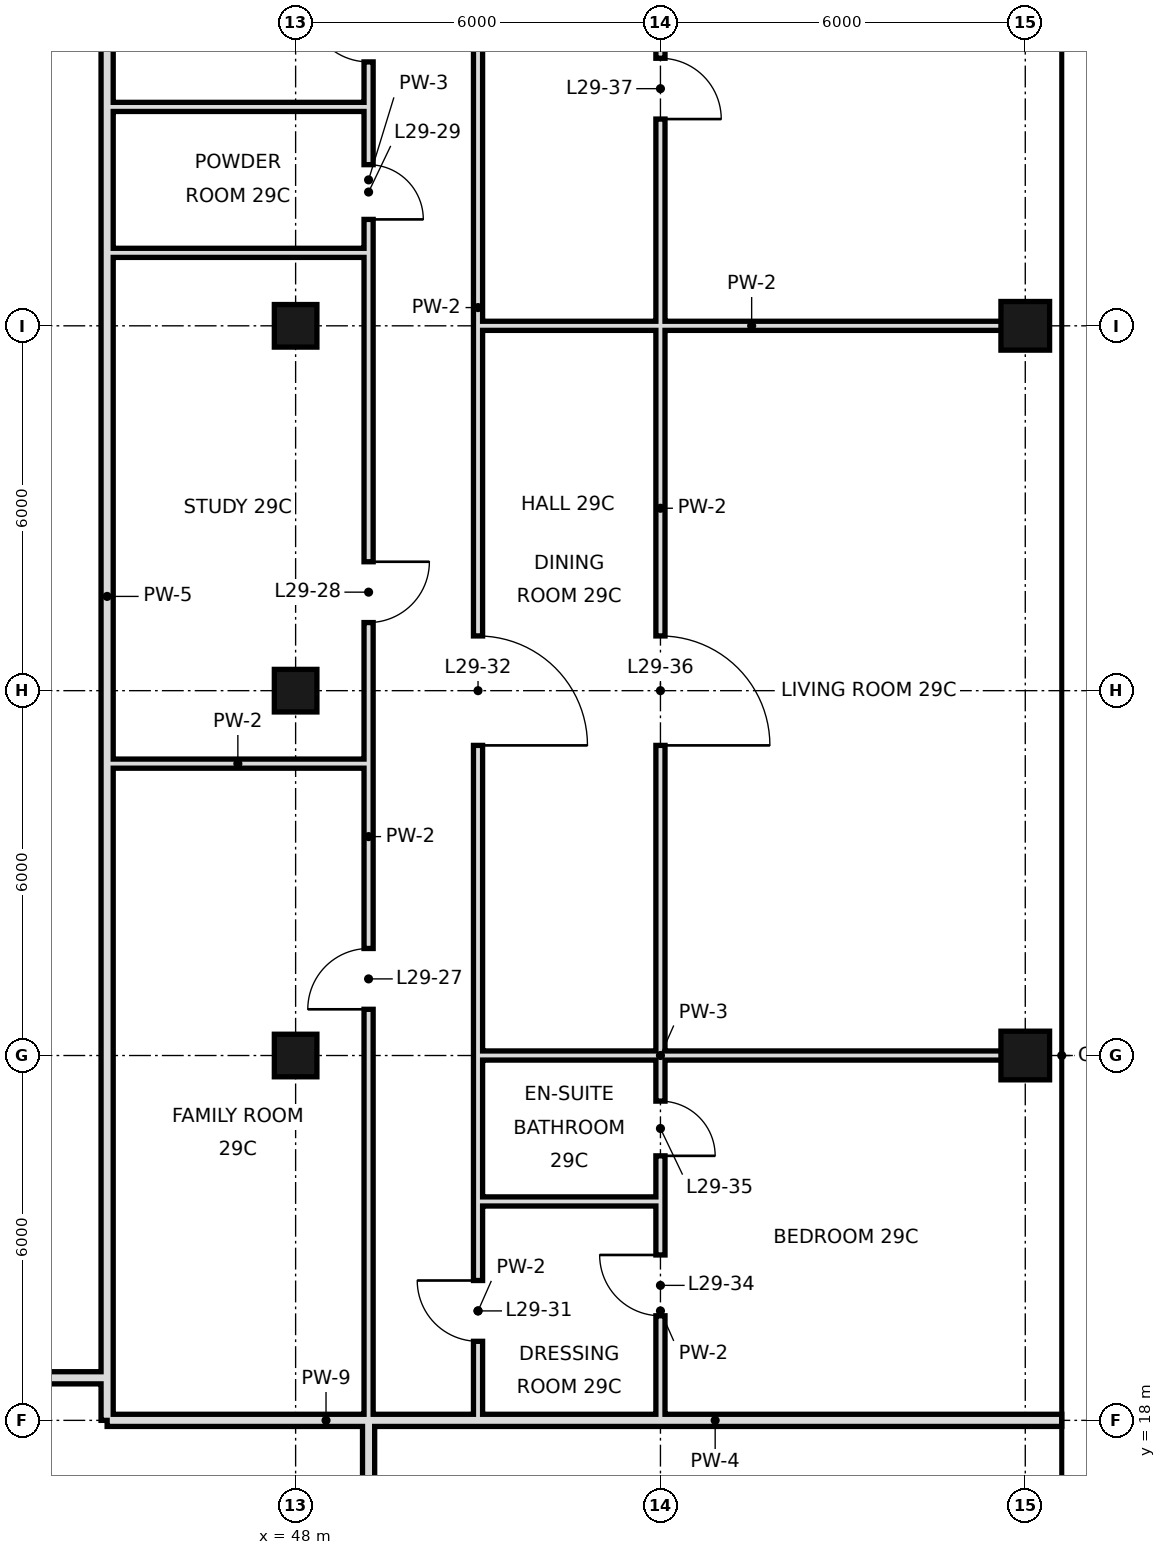
"""IFC4 building model, lengths in metres.
Left out: names, types, materials, properties, quantities, classifications, styles, units other than length and angle.
Written with IfcOpenShell. Run it as: python <this file> out.ifc"""

import sys

from ifc_helpers import new_model, si_unit, direction, frame, frame_2d, origin, origin_2d, place, context, subcontext, project, spatial, rectangle, hollow_rectangle, extrude, element, fill, save


model = new_model("IFC4")
c1 = context("Model", 3, precision=1e-05, world=origin(), true_north=direction((0.0, 1.0)))
c2 = subcontext(c1, "Body", "Model", "MODEL_VIEW")
j1 = project(units=[si_unit("LENGTHUNIT", "METRE"), si_unit("PLANEANGLEUNIT", "RADIAN")], contexts=[c1])
p1 = place(None, origin())
s1 = spatial("IfcSite", under=j1, at=p1, CompositionType="ELEMENT")
p2 = place(p1, origin())
s2 = spatial("IfcBuilding", under=s1, at=p2, CompositionType="ELEMENT")
p3 = place(p2, frame((0.0, 0.0, 130.4)))
s3 = spatial("IfcBuildingStorey", under=s2, at=p3, CompositionType="ELEMENT", Elevation=130.4)
for number, where, z_axis, x_axis in (
    (1, (48.0, 24.0, 0.0), (0.0, 0.0, 1.0), (1.0, 0.0, 0.0)),
    (2, (48.0, 30.0, 0.0), (0.0, 0.0, 1.0), (1.0, 0.0, 0.0)),
    (3, (48.0, 36.0, 0.0), (0.0, 0.0, 1.0), (1.0, 0.0, 0.0)),
):
    element("IfcColumn", number, at=place(p3, frame(where, z_axis=z_axis, x_axis=x_axis)), inside=s3, PredefinedType="COLUMN", context=c2, shape_type="SweptSolid", body=[
        extrude(hollow_rectangle(XDim=0.7, YDim=0.7, WallThickness=0.036, at=origin_2d()), origin(), (0.0, 0.0, 1.0), 3.6),
    ])
for number, where, z_axis, x_axis in (
    (4, (60.0, 24.0, 0.0), (0.0, 0.0, 1.0), (1.0, 0.0, 0.0)),
    (5, (60.0, 36.0, 0.0), (0.0, 0.0, 1.0), (1.0, 0.0, 0.0)),
):
    element("IfcColumn", number, at=place(p3, frame(where, z_axis=z_axis, x_axis=x_axis)), inside=s3, PredefinedType="COLUMN", context=c2, shape_type="SweptSolid", body=[
        extrude(hollow_rectangle(XDim=0.8, YDim=0.8, WallThickness=0.04, at=origin_2d()), origin(), (0.0, 0.0, 1.0), 3.6),
    ])
p4 = place(p3, frame((44.9, 18.7, 0.0), z_axis=(0.0, 0.0, 1.0), x_axis=(0.0, 1.0, 0.0)))
e6 = element("IfcWall", 6, at=p4, inside=s3, PredefinedType="SOLIDWALL", context=c2, shape_type="SweptSolid", body=[
    extrude(rectangle(XDim=25.7, YDim=0.2, at=frame_2d((12.85, 0.0))), origin(), (0.0, 0.0, 1.0), 2.97),
])
p5 = place(p4, frame((22.7, 0.0, 0.0)))
e7 = element("IfcOpeningElement", 7, at=p5, cuts=e6, PredefinedType="OPENING", context=c2, shape_type="SweptSolid", body=[
    extrude(rectangle(XDim=1.2, YDim=2.4, at=frame_2d((0.6, 1.2))), frame((0.0, 0.11, 0.0), z_axis=(0.0, -1.0, 0.0), x_axis=(1.0, 0.0, 0.0)), (0.0, 0.0, 1.0), 0.22),
])
p6 = place(p3, frame((44.9, 18.0, 0.0), z_axis=(0.0, 0.0, 1.0), x_axis=(0.0, 1.0, 0.0)))
e8 = element("IfcWall", 8, at=p6, inside=s3, PredefinedType="SOLIDWALL", context=c2, shape_type="SweptSolid", body=[
    extrude(rectangle(XDim=0.7, YDim=0.2, at=frame_2d((0.35, 0.0))), origin(), (0.0, 0.0, 1.0), 2.97),
])
p7 = place(p3, frame((49.2, 10.8, 0.0), z_axis=(0.0, 0.0, 1.0), x_axis=(0.0, 1.0, 0.0)))
e9 = element("IfcWall", 9, at=p7, inside=s3, PredefinedType="SOLIDWALL", context=c2, shape_type="SweptSolid", body=[
    extrude(rectangle(XDim=7.2, YDim=0.2, at=frame_2d((3.6, 0.0))), origin(), (0.0, 0.0, 1.0), 2.72),
])
p8 = place(p3, frame((49.2, 18.0, 0.0), z_axis=(0.0, 0.0, 1.0), x_axis=(0.0, 1.0, 0.0)))
e10 = element("IfcWall", 10, at=p8, inside=s3, PredefinedType="PARTITIONING", context=c2, shape_type="SweptSolid", body=[
    extrude(rectangle(XDim=19.2, YDim=0.15, at=frame_2d((9.6, 0.0))), origin(), (0.0, 0.0, 1.0), 3.42),
])
p9 = place(p8, frame((6.76, 0.0, 0.0)))
e11 = element("IfcOpeningElement", 11, at=p9, cuts=e10, PredefinedType="OPENING", context=c2, shape_type="SweptSolid", body=[
    extrude(rectangle(XDim=1.0, YDim=2.4, at=frame_2d((0.5, 1.2))), frame((0.0, 0.085, 0.0), z_axis=(0.0, -1.0, 0.0), x_axis=(1.0, 0.0, 0.0)), (0.0, 0.0, 1.0), 0.17),
])
p10 = place(p8, frame((13.12, 0.0, 0.0)))
e12 = element("IfcOpeningElement", 12, at=p10, cuts=e10, PredefinedType="OPENING", context=c2, shape_type="SweptSolid", body=[
    extrude(rectangle(XDim=1.0, YDim=2.4, at=frame_2d((0.5, 1.2))), frame((0.0, 0.085, 0.0), z_axis=(0.0, -1.0, 0.0), x_axis=(1.0, 0.0, 0.0)), (0.0, 0.0, 1.0), 0.17),
])
p11 = place(p3, frame((49.2, 39.6, 0.0), z_axis=(0.0, 0.0, 1.0), x_axis=(0.0, 1.0, 0.0)))
e13 = element("IfcWall", 13, at=p11, inside=s3, PredefinedType="PARTITIONING", context=c2, shape_type="SweptSolid", body=[
    extrude(rectangle(XDim=4.8, YDim=0.15, at=frame_2d((2.4, 0.0))), origin(), (0.0, 0.0, 1.0), 3.42),
])
p12 = place(p11, frame((0.74, 0.0, 0.0)))
e14 = element("IfcOpeningElement", 14, at=p12, cuts=e13, PredefinedType="OPENING", context=c2, shape_type="SweptSolid", body=[
    extrude(rectangle(XDim=1.0, YDim=2.4, at=frame_2d((0.5, 1.2))), frame((0.0, 0.085, 0.0), z_axis=(0.0, -1.0, 0.0), x_axis=(1.0, 0.0, 0.0)), (0.0, 0.0, 1.0), 0.17),
])
p13 = place(p3, frame((49.2, 37.2, 0.0), z_axis=(0.0, 0.0, 1.0), x_axis=(0.0, 1.0, 0.0)))
e15 = element("IfcWall", 15, at=p13, inside=s3, PredefinedType="PARTITIONING", context=c2, shape_type="SweptSolid", body=[
    extrude(rectangle(XDim=2.4, YDim=0.15, at=frame_2d((1.2, 0.0))), origin(), (0.0, 0.0, 1.0), 3.42),
])
p14 = place(p13, frame((0.55, 0.0, 0.0)))
e16 = element("IfcOpeningElement", 16, at=p14, cuts=e15, PredefinedType="OPENING", context=c2, shape_type="SweptSolid", body=[
    extrude(rectangle(XDim=0.9, YDim=2.4, at=frame_2d((0.45, 1.2))), frame((0.0, 0.085, 0.0), z_axis=(0.0, -1.0, 0.0), x_axis=(1.0, 0.0, 0.0)), (0.0, 0.0, 1.0), 0.17),
])
p15 = place(p3, frame((51.0, 18.0, 0.0), z_axis=(0.0, 0.0, 1.0), x_axis=(0.0, 1.0, 0.0)))
e17 = element("IfcWall", 17, at=p15, inside=s3, PredefinedType="PARTITIONING", context=c2, shape_type="SweptSolid", body=[
    extrude(rectangle(XDim=3.6, YDim=0.15, at=frame_2d((1.8, 0.0))), origin(), (0.0, 0.0, 1.0), 3.42),
])
p16 = place(p15, frame((1.3, 0.0, 0.0)))
e18 = element("IfcOpeningElement", 18, at=p16, cuts=e17, PredefinedType="OPENING", context=c2, shape_type="SweptSolid", body=[
    extrude(rectangle(XDim=1.0, YDim=2.4, at=frame_2d((0.5, 1.2))), frame((0.0, 0.085, 0.0), z_axis=(0.0, -1.0, 0.0), x_axis=(1.0, 0.0, 0.0)), (0.0, 0.0, 1.0), 0.17),
])
p17 = place(p3, frame((51.0, 24.0, 0.0), z_axis=(0.0, 0.0, 1.0), x_axis=(0.0, 1.0, 0.0)))
e19 = element("IfcWall", 19, at=p17, inside=s3, PredefinedType="PARTITIONING", context=c2, shape_type="SweptSolid", body=[
    extrude(rectangle(XDim=24.6, YDim=0.15, at=frame_2d((12.3, 0.0))), origin(), (0.0, 0.0, 1.0), 3.42),
])
p18 = place(p17, frame((5.1, 0.0, 0.0)))
e20 = element("IfcOpeningElement", 20, at=p18, cuts=e19, PredefinedType="OPENING", context=c2, shape_type="SweptSolid", body=[
    extrude(rectangle(XDim=1.8, YDim=2.4, at=frame_2d((0.9, 1.2))), frame((0.0, 0.085, 0.0), z_axis=(0.0, -1.0, 0.0), x_axis=(1.0, 0.0, 0.0)), (0.0, 0.0, 1.0), 0.17),
])
p19 = place(p17, frame((19.6, 0.0, 0.0)))
e21 = element("IfcOpeningElement", 21, at=p19, cuts=e19, PredefinedType="OPENING", context=c2, shape_type="SweptSolid", body=[
    extrude(rectangle(XDim=1.0, YDim=2.4, at=frame_2d((0.5, 1.2))), frame((0.0, 0.085, 0.0), z_axis=(0.0, -1.0, 0.0), x_axis=(1.0, 0.0, 0.0)), (0.0, 0.0, 1.0), 0.17),
])
p20 = place(p3, frame((51.0, 21.6, 0.0), z_axis=(0.0, 0.0, 1.0), x_axis=(0.0, 1.0, 0.0)))
e22 = element("IfcWall", 22, at=p20, inside=s3, PredefinedType="PARTITIONING", context=c2, shape_type="SweptSolid", body=[
    extrude(rectangle(XDim=2.4, YDim=0.15, at=frame_2d((1.2, 0.0))), origin(), (0.0, 0.0, 1.0), 3.42),
])
p21 = place(p3, frame((54.0, 18.0, 0.0), z_axis=(0.0, 0.0, 1.0), x_axis=(0.0, 1.0, 0.0)))
e23 = element("IfcWall", 23, at=p21, inside=s3, PredefinedType="PARTITIONING", context=c2, shape_type="SweptSolid", body=[
    extrude(rectangle(XDim=3.6, YDim=0.15, at=frame_2d((1.8, 0.0))), origin(), (0.0, 0.0, 1.0), 3.42),
])
p22 = place(p21, frame((1.72, 0.0, 0.0)))
e24 = element("IfcOpeningElement", 24, at=p22, cuts=e23, PredefinedType="OPENING", context=c2, shape_type="SweptSolid", body=[
    extrude(rectangle(XDim=1.0, YDim=2.4, at=frame_2d((0.5, 1.2))), frame((0.0, 0.085, 0.0), z_axis=(0.0, -1.0, 0.0), x_axis=(1.0, 0.0, 0.0)), (0.0, 0.0, 1.0), 0.17),
])
p23 = place(p3, frame((54.0, 24.0, 0.0), z_axis=(0.0, 0.0, 1.0), x_axis=(0.0, 1.0, 0.0)))
e25 = element("IfcWall", 25, at=p23, inside=s3, PredefinedType="PARTITIONING", context=c2, shape_type="SweptSolid", body=[
    extrude(rectangle(XDim=24.0, YDim=0.15, at=frame_2d((12.0, 0.0))), origin(), (0.0, 0.0, 1.0), 3.42),
])
p24 = place(p23, frame((5.1, 0.0, 0.0)))
e26 = element("IfcOpeningElement", 26, at=p24, cuts=e25, PredefinedType="OPENING", context=c2, shape_type="SweptSolid", body=[
    extrude(rectangle(XDim=1.8, YDim=2.4, at=frame_2d((0.9, 1.2))), frame((0.0, 0.085, 0.0), z_axis=(0.0, -1.0, 0.0), x_axis=(1.0, 0.0, 0.0)), (0.0, 0.0, 1.0), 0.17),
])
p25 = place(p23, frame((15.4, 0.0, 0.0)))
e27 = element("IfcOpeningElement", 27, at=p25, cuts=e25, PredefinedType="OPENING", context=c2, shape_type="SweptSolid", body=[
    extrude(rectangle(XDim=1.0, YDim=2.4, at=frame_2d((0.5, 1.2))), frame((0.0, 0.085, 0.0), z_axis=(0.0, -1.0, 0.0), x_axis=(1.0, 0.0, 0.0)), (0.0, 0.0, 1.0), 0.17),
])
p26 = place(p3, frame((54.0, 21.6, 0.0), z_axis=(0.0, 0.0, 1.0), x_axis=(0.0, 1.0, 0.0)))
e28 = element("IfcWall", 28, at=p26, inside=s3, PredefinedType="PARTITIONING", context=c2, shape_type="SweptSolid", body=[
    extrude(rectangle(XDim=2.4, YDim=0.15, at=frame_2d((1.2, 0.0))), origin(), (0.0, 0.0, 1.0), 3.42),
])
p27 = place(p26, frame((0.75, 0.0, 0.0)))
e29 = element("IfcOpeningElement", 29, at=p27, cuts=e28, PredefinedType="OPENING", context=c2, shape_type="SweptSolid", body=[
    extrude(rectangle(XDim=0.9, YDim=2.4, at=frame_2d((0.45, 1.2))), frame((0.0, 0.085, 0.0), z_axis=(0.0, -1.0, 0.0), x_axis=(1.0, 0.0, 0.0)), (0.0, 0.0, 1.0), 0.17),
])
p28 = place(p3, frame((44.9, 18.0, 0.0), z_axis=(0.0, 0.0, 1.0), x_axis=(1.0, 0.0, 0.0)))
e30 = element("IfcWall", 30, at=p28, inside=s3, PredefinedType="SOLIDWALL", context=c2, shape_type="SweptSolid", body=[
    extrude(rectangle(XDim=4.3, YDim=0.2, at=frame_2d((2.15, 0.0))), origin(), (0.0, 0.0, 1.0), 2.72),
])
p29 = place(p3, frame((49.2, 18.0, 0.0), z_axis=(0.0, 0.0, 1.0), x_axis=(1.0, 0.0, 0.0)))
e31 = element("IfcWall", 31, at=p29, inside=s3, PredefinedType="SOLIDWALL", context=c2, shape_type="SweptSolid", body=[
    extrude(rectangle(XDim=11.4, YDim=0.2, at=frame_2d((5.7, 0.0))), origin(), (0.0, 0.0, 1.0), 2.72),
])
p30 = place(p3, frame((43.8, 18.7, 0.0), z_axis=(0.0, 0.0, 1.0), x_axis=(1.0, 0.0, 0.0)))
e32 = element("IfcWall", 32, at=p30, inside=s3, PredefinedType="SOLIDWALL", context=c2, shape_type="SweptSolid", body=[
    extrude(rectangle(XDim=1.1, YDim=0.2, at=frame_2d((0.55, 0.0))), origin(), (0.0, 0.0, 1.0), 3.42),
])
p31 = place(p3, frame((51.0, 21.6, 0.0), z_axis=(0.0, 0.0, 1.0), x_axis=(1.0, 0.0, 0.0)))
e33 = element("IfcWall", 33, at=p31, inside=s3, PredefinedType="PARTITIONING", context=c2, shape_type="SweptSolid", body=[
    extrude(rectangle(XDim=3.0, YDim=0.15, at=frame_2d((1.5, 0.0))), origin(), (0.0, 0.0, 1.0), 3.42),
])
p32 = place(p3, frame((54.0, 24.0, 0.0), z_axis=(0.0, 0.0, 1.0), x_axis=(1.0, 0.0, 0.0)))
e34 = element("IfcWall", 34, at=p32, inside=s3, PredefinedType="PARTITIONING", context=c2, shape_type="SweptSolid", body=[
    extrude(rectangle(XDim=6.0, YDim=0.15, at=frame_2d((3.0, 0.0))), origin(), (0.0, 0.0, 1.0), 2.72),
])
p33 = place(p3, frame((51.0, 24.0, 0.0), z_axis=(0.0, 0.0, 1.0), x_axis=(1.0, 0.0, 0.0)))
e35 = element("IfcWall", 35, at=p33, inside=s3, PredefinedType="PARTITIONING", context=c2, shape_type="SweptSolid", body=[
    extrude(rectangle(XDim=3.0, YDim=0.15, at=frame_2d((1.5, 0.0))), origin(), (0.0, 0.0, 1.0), 2.72),
])
p34 = place(p3, frame((44.9, 28.8, 0.0), z_axis=(0.0, 0.0, 1.0), x_axis=(1.0, 0.0, 0.0)))
e36 = element("IfcWall", 36, at=p34, inside=s3, PredefinedType="PARTITIONING", context=c2, shape_type="SweptSolid", body=[
    extrude(rectangle(XDim=4.3, YDim=0.15, at=frame_2d((2.15, 0.0))), origin(), (0.0, 0.0, 1.0), 3.42),
])
p35 = place(p3, frame((51.0, 36.0, 0.0), z_axis=(0.0, 0.0, 1.0), x_axis=(1.0, 0.0, 0.0)))
e37 = element("IfcWall", 37, at=p35, inside=s3, PredefinedType="PARTITIONING", context=c2, shape_type="SweptSolid", body=[
    extrude(rectangle(XDim=9.0, YDim=0.15, at=frame_2d((4.5, 0.0))), origin(), (0.0, 0.0, 1.0), 2.72),
])
for number, where, z_axis, x_axis in (
    (38, (44.9, 37.2, 0.0), (0.0, 0.0, 1.0), (1.0, 0.0, 0.0)),
    (39, (44.9, 39.6, 0.0), (0.0, 0.0, 1.0), (1.0, 0.0, 0.0)),
):
    element("IfcWall", number, at=place(p3, frame(where, z_axis=z_axis, x_axis=x_axis)), inside=s3, PredefinedType="PARTITIONING", context=c2, shape_type="SweptSolid", body=[
        extrude(rectangle(XDim=4.3, YDim=0.15, at=frame_2d((2.15, 0.0))), origin(), (0.0, 0.0, 1.0), 3.42),
    ])
p36 = place(p12, frame((1.0, 0.0, 0.0), z_axis=(0.0, 0.0, 1.0), x_axis=(-1.0, 0.0, 0.0)))
e40 = element("IfcDoor", 40, at=p36, inside=s3, OperationType="SINGLE_SWING_LEFT", PredefinedType="DOOR", context=c2, shape_type="SweptSolid", body=[
    extrude(rectangle(XDim=1.0, YDim=2.4, at=frame_2d((0.5, 1.2))), frame((0.0, 0.025, 0.0), z_axis=(0.0, -1.0, 0.0), x_axis=(1.0, 0.0, 0.0)), (0.0, 0.0, 1.0), 0.05),
])
fill(e14, e40)
p37 = place(p9, origin())
e41 = element("IfcDoor", 41, at=p37, inside=s3, OperationType="SINGLE_SWING_LEFT", PredefinedType="DOOR", context=c2, shape_type="SweptSolid", body=[
    extrude(rectangle(XDim=1.0, YDim=2.4, at=frame_2d((0.5, 1.2))), frame((0.0, 0.025, 0.0), z_axis=(0.0, -1.0, 0.0), x_axis=(1.0, 0.0, 0.0)), (0.0, 0.0, 1.0), 0.05),
])
fill(e11, e41)
p38 = place(p10, origin())
e42 = element("IfcDoor", 42, at=p38, inside=s3, OperationType="SINGLE_SWING_RIGHT", PredefinedType="DOOR", context=c2, shape_type="SweptSolid", body=[
    extrude(rectangle(XDim=1.0, YDim=2.4, at=frame_2d((0.5, 1.2))), frame((0.0, 0.025, 0.0), z_axis=(0.0, -1.0, 0.0), x_axis=(1.0, 0.0, 0.0)), (0.0, 0.0, 1.0), 0.05),
])
fill(e12, e42)
p39 = place(p14, frame((0.9, 0.0, 0.0), z_axis=(0.0, 0.0, 1.0), x_axis=(-1.0, 0.0, 0.0)))
e43 = element("IfcDoor", 43, at=p39, inside=s3, OperationType="SINGLE_SWING_RIGHT", PredefinedType="DOOR", context=c2, shape_type="SweptSolid", body=[
    extrude(rectangle(XDim=0.9, YDim=2.4, at=frame_2d((0.45, 1.2))), frame((0.0, 0.025, 0.0), z_axis=(0.0, -1.0, 0.0), x_axis=(1.0, 0.0, 0.0)), (0.0, 0.0, 1.0), 0.05),
])
fill(e16, e43)
p40 = place(p16, frame((1.0, 0.0, 0.0), z_axis=(0.0, 0.0, 1.0), x_axis=(-1.0, 0.0, 0.0)))
e44 = element("IfcDoor", 44, at=p40, inside=s3, OperationType="SINGLE_SWING_LEFT", PredefinedType="DOOR", context=c2, shape_type="SweptSolid", body=[
    extrude(rectangle(XDim=1.0, YDim=2.4, at=frame_2d((0.5, 1.2))), frame((0.0, 0.025, 0.0), z_axis=(0.0, -1.0, 0.0), x_axis=(1.0, 0.0, 0.0)), (0.0, 0.0, 1.0), 0.05),
])
fill(e18, e44)
p41 = place(p18, frame((1.8, 0.0, 0.0), z_axis=(0.0, 0.0, 1.0), x_axis=(-1.0, 0.0, 0.0)))
e45 = element("IfcDoor", 45, at=p41, inside=s3, OperationType="SINGLE_SWING_RIGHT", PredefinedType="DOOR", context=c2, shape_type="SweptSolid", body=[
    extrude(rectangle(XDim=1.8, YDim=2.4, at=frame_2d((0.9, 1.2))), frame((0.0, 0.025, 0.0), z_axis=(0.0, -1.0, 0.0), x_axis=(1.0, 0.0, 0.0)), (0.0, 0.0, 1.0), 0.05),
])
fill(e20, e45)
p42 = place(p22, frame((1.0, 0.0, 0.0), z_axis=(0.0, 0.0, 1.0), x_axis=(-1.0, 0.0, 0.0)))
e46 = element("IfcDoor", 46, at=p42, inside=s3, OperationType="SINGLE_SWING_LEFT", PredefinedType="DOOR", context=c2, shape_type="SweptSolid", body=[
    extrude(rectangle(XDim=1.0, YDim=2.4, at=frame_2d((0.5, 1.2))), frame((0.0, 0.025, 0.0), z_axis=(0.0, -1.0, 0.0), x_axis=(1.0, 0.0, 0.0)), (0.0, 0.0, 1.0), 0.05),
])
fill(e24, e46)
p43 = place(p27, frame((0.9, 0.0, 0.0), z_axis=(0.0, 0.0, 1.0), x_axis=(-1.0, 0.0, 0.0)))
e47 = element("IfcDoor", 47, at=p43, inside=s3, OperationType="SINGLE_SWING_RIGHT", PredefinedType="DOOR", context=c2, shape_type="SweptSolid", body=[
    extrude(rectangle(XDim=0.9, YDim=2.4, at=frame_2d((0.45, 1.2))), frame((0.0, 0.025, 0.0), z_axis=(0.0, -1.0, 0.0), x_axis=(1.0, 0.0, 0.0)), (0.0, 0.0, 1.0), 0.05),
])
fill(e29, e47)
p44 = place(p24, frame((1.8, 0.0, 0.0), z_axis=(0.0, 0.0, 1.0), x_axis=(-1.0, 0.0, 0.0)))
e48 = element("IfcDoor", 48, at=p44, inside=s3, OperationType="SINGLE_SWING_RIGHT", PredefinedType="DOOR", context=c2, shape_type="SweptSolid", body=[
    extrude(rectangle(XDim=1.8, YDim=2.4, at=frame_2d((0.9, 1.2))), frame((0.0, 0.025, 0.0), z_axis=(0.0, -1.0, 0.0), x_axis=(1.0, 0.0, 0.0)), (0.0, 0.0, 1.0), 0.05),
])
fill(e26, e48)
p45 = place(p25, frame((1.0, 0.0, 0.0), z_axis=(0.0, 0.0, 1.0), x_axis=(-1.0, 0.0, 0.0)))
e49 = element("IfcDoor", 49, at=p45, inside=s3, OperationType="SINGLE_SWING_RIGHT", PredefinedType="DOOR", context=c2, shape_type="SweptSolid", body=[
    extrude(rectangle(XDim=1.0, YDim=2.4, at=frame_2d((0.5, 1.2))), frame((0.0, 0.025, 0.0), z_axis=(0.0, -1.0, 0.0), x_axis=(1.0, 0.0, 0.0)), (0.0, 0.0, 1.0), 0.05),
])
fill(e27, e49)
save(model, sys.argv[1])
